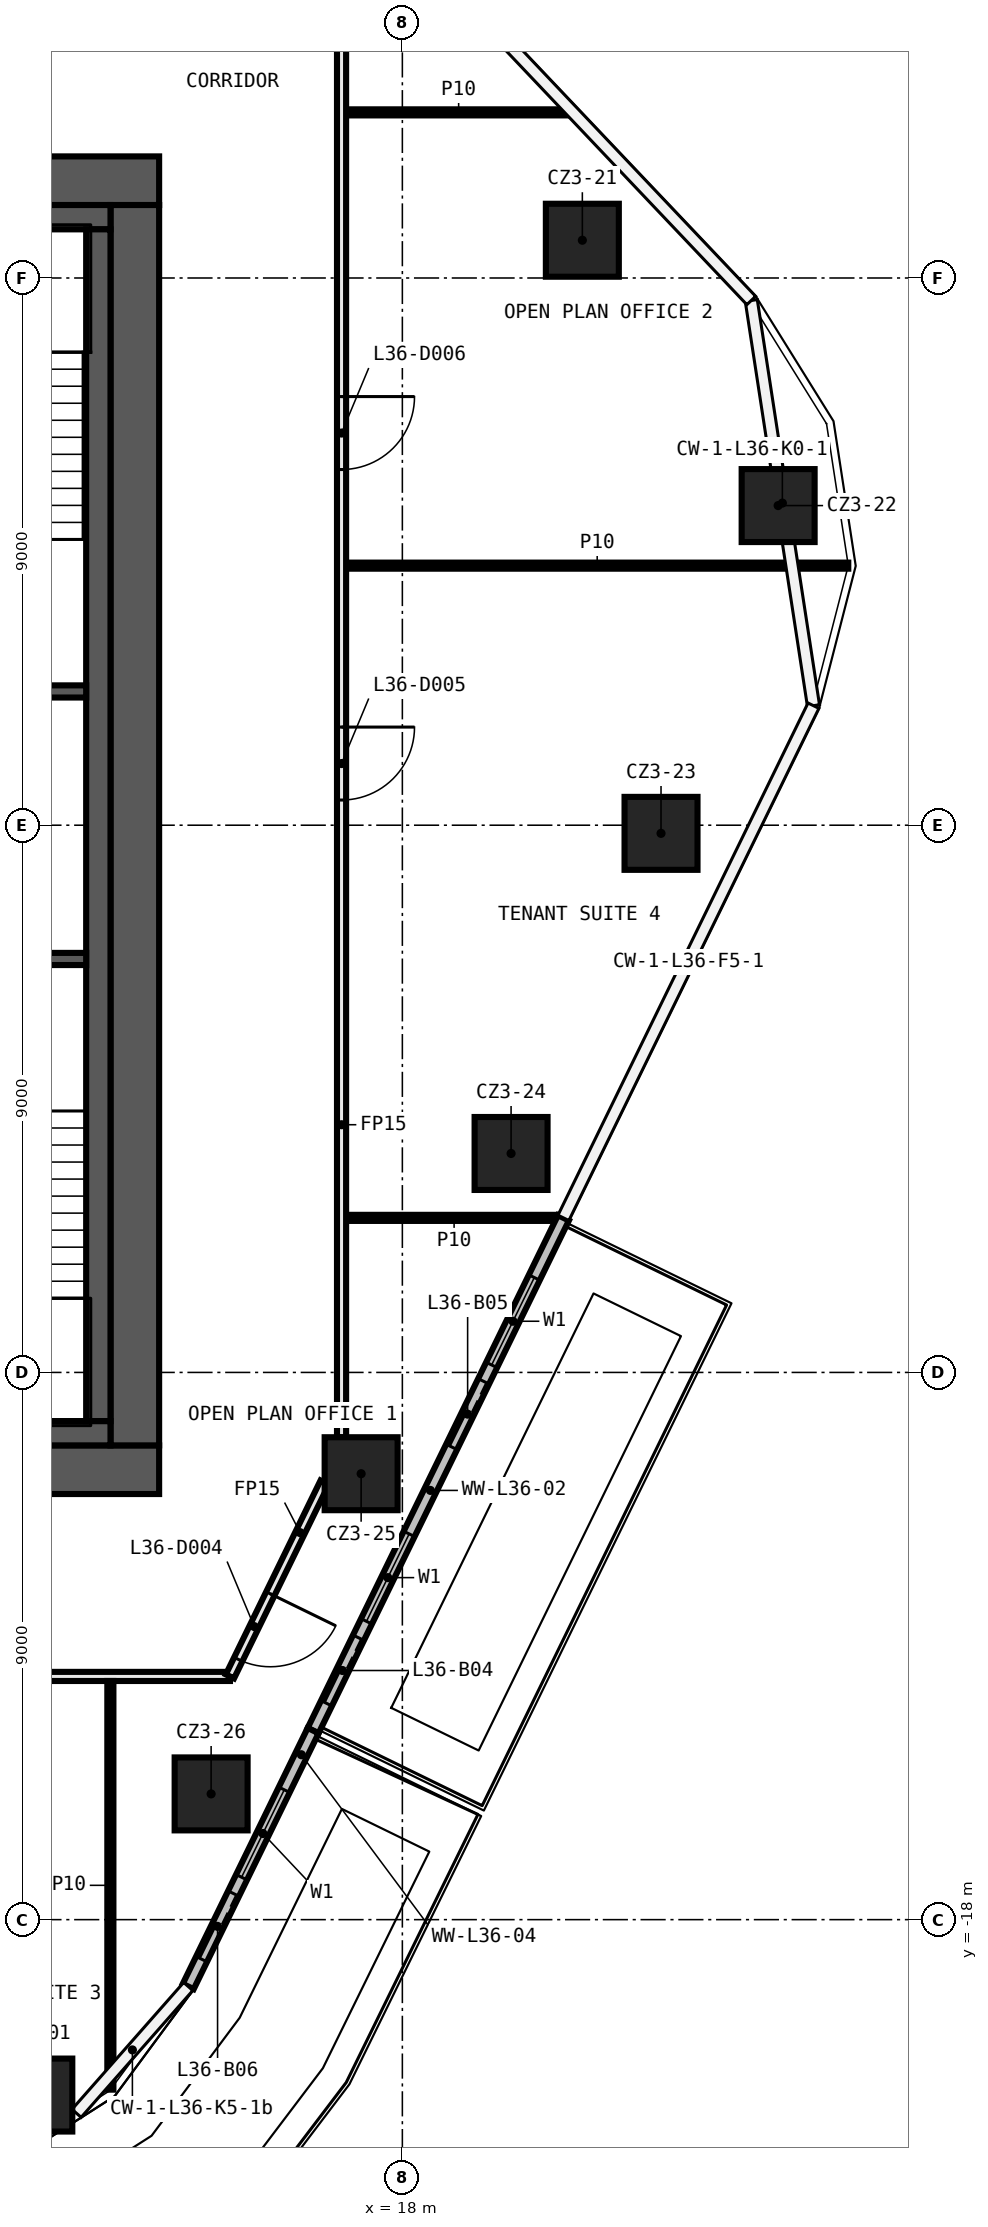
"""IFC4 building model, lengths in metres.
Left out: names, types, materials, properties, quantities, classifications, styles, units other than length and angle.
Written with IfcOpenShell. Run it as: python <this file> out.ifc"""

import sys

from ifc_helpers import new_model, si_unit, direction, frame, frame_2d, origin, origin_2d, place, context, subcontext, project, spatial, rectangle, extrude, element, fill, save


model = new_model("IFC4")
c1 = context("Model", 3, precision=1e-05, world=origin(), true_north=direction((0.0, 1.0)))
c2 = subcontext(c1, "Body", "Model", "MODEL_VIEW")
j1 = project(units=[si_unit("LENGTHUNIT", "METRE"), si_unit("PLANEANGLEUNIT", "RADIAN")], contexts=[c1])
p1 = place(None, origin())
s1 = spatial("IfcSite", under=j1, at=p1, CompositionType="ELEMENT")
p2 = place(p1, origin())
s2 = spatial("IfcBuilding", under=s1, at=p2, CompositionType="ELEMENT")
p3 = place(p2, frame((0.0, 0.0, 167.0)))
s3 = spatial("IfcBuildingStorey", under=s2, at=p3, CompositionType="ELEMENT", Elevation=167.0)
for number, where, z_axis, x_axis in (
    (1, (11.972, -20.885, 0.0), (0.0, 0.0, 1.0), (1.0, 0.0, 0.0)),
    (2, (20.96, 9.621, 0.0), (0.0, 0.0, 1.0), (1.0, 0.0, 0.0)),
    (3, (24.18, 5.257, 0.0), (0.0, 0.0, 1.0), (1.0, 0.0, 0.0)),
    (4, (22.254, -0.134, 0.0), (0.0, 0.0, 1.0), (1.0, 0.0, 0.0)),
    (5, (19.788, -5.399, 0.0), (0.0, 0.0, 1.0), (1.0, 0.0, 0.0)),
    (6, (17.322, -10.666, 0.0), (0.0, 0.0, 1.0), (1.0, 0.0, 0.0)),
    (7, (14.855, -15.932, 0.0), (0.0, 0.0, 1.0), (1.0, 0.0, 0.0)),
):
    element("IfcColumn", number, at=place(p3, frame(where, z_axis=z_axis, x_axis=x_axis)), inside=s3, PredefinedType="COLUMN", context=c2, shape_type="SweptSolid", body=[
        extrude(rectangle(XDim=1.2, YDim=1.2, at=origin_2d()), origin(), (0.0, 0.0, 1.0), 3.82),
    ])
p4 = place(p3, frame((15.165, -14.0, 0.0), z_axis=(0.0, 0.0, 1.0), x_axis=(-1.0, 0.0, 0.0)))
e8 = element("IfcWall", 8, at=p4, inside=s3, PredefinedType="PARTITIONING", context=c2, shape_type="SweptSolid", body=[
    extrude(rectangle(XDim=24.24, YDim=0.15, at=frame_2d((12.12, 0.0))), origin(), (0.0, 0.0, 1.0), 3.82),
])
p5 = place(p4, frame((15.788, 0.0, 0.0)))
e9 = element("IfcOpeningElement", 9, at=p5, cuts=e8, PredefinedType="OPENING", context=c2, shape_type="SweptSolid", body=[
    extrude(rectangle(XDim=1.2, YDim=2.1, at=frame_2d((0.6, 1.05))), frame((0.0, 0.085, 0.0), z_axis=(0.0, -1.0, 0.0), x_axis=(1.0, 0.0, 0.0)), (0.0, 0.0, 1.0), 0.17),
])
p6 = place(p4, frame((7.379, 0.0, 0.0)))
e10 = element("IfcOpeningElement", 10, at=p6, cuts=e8, PredefinedType="OPENING", context=c2, shape_type="SweptSolid", body=[
    extrude(rectangle(XDim=1.2, YDim=2.1, at=frame_2d((0.6, 1.05))), frame((0.0, 0.085, 0.0), z_axis=(0.0, -1.0, 0.0), x_axis=(1.0, 0.0, 0.0)), (0.0, 0.0, 1.0), 0.17),
])
p7 = place(p4, frame((3.323, 0.0, 0.0)))
e11 = element("IfcOpeningElement", 11, at=p7, cuts=e8, PredefinedType="OPENING", context=c2, shape_type="SweptSolid", body=[
    extrude(rectangle(XDim=1.2, YDim=2.1, at=frame_2d((0.6, 1.05))), frame((0.0, 0.085, 0.0), z_axis=(0.0, -1.0, 0.0), x_axis=(1.0, 0.0, 0.0)), (0.0, 0.0, 1.0), 0.17),
])
p8 = place(p3, frame((17.075, -6.458, 0.0), z_axis=(0.0, 0.0, 1.0), x_axis=(1.0, 0.0, 0.0)))
e12 = element("IfcWall", 12, at=p8, inside=s3, PredefinedType="PARTITIONING", context=c2, shape_type="SweptSolid", body=[
    extrude(rectangle(XDim=3.552, YDim=0.1, at=frame_2d((1.776, 0.0))), origin(), (0.0, 0.0, 1.0), 3.82),
])
p9 = place(p3, frame((17.075, 4.269, 0.0), z_axis=(0.0, 0.0, 1.0), x_axis=(1.0, 0.0, 0.0)))
e13 = element("IfcWall", 13, at=p9, inside=s3, PredefinedType="PARTITIONING", context=c2, shape_type="SweptSolid", body=[
    extrude(rectangle(XDim=8.259, YDim=0.1, at=frame_2d((4.129, 0.0))), origin(), (0.0, 0.0, 1.0), 3.82),
])
p10 = place(p3, frame((17.075, 11.724, 0.0), z_axis=(0.0, 0.0, 1.0), x_axis=(1.0, 0.0, 0.0)))
e14 = element("IfcWall", 14, at=p10, inside=s3, PredefinedType="PARTITIONING", context=c2, shape_type="SweptSolid", body=[
    extrude(rectangle(XDim=3.701, YDim=0.1, at=frame_2d((1.851, 0.0))), origin(), (0.0, 0.0, 1.0), 3.82),
])
p11 = place(p3, frame((16.722, -10.809, 0.0), z_axis=(0.0, 0.0, 1.0), x_axis=(-0.438666135365, -0.898650110824, 0.0)))
e15 = element("IfcWall", 15, at=p11, inside=s3, PredefinedType="PARTITIONING", context=c2, shape_type="SweptSolid", body=[
    extrude(rectangle(XDim=3.55, YDim=0.15, at=frame_2d((1.775, 0.0))), origin(), (0.0, 0.0, 1.0), 3.82),
])
p12 = place(p11, frame((2.038, 0.0, 0.0)))
e16 = element("IfcOpeningElement", 16, at=p12, cuts=e15, PredefinedType="OPENING", context=c2, shape_type="SweptSolid", body=[
    extrude(rectangle(XDim=1.2, YDim=2.1, at=frame_2d((0.6, 1.05))), frame((0.0, 0.085, 0.0), z_axis=(0.0, -1.0, 0.0), x_axis=(1.0, 0.0, 0.0)), (0.0, 0.0, 1.0), 0.17),
])
p13 = place(p3, frame((17.0, 13.106, 0.0), z_axis=(0.0, 0.0, 1.0), x_axis=(0.0, -1.0, 0.0)))
e17 = element("IfcWall", 17, at=p13, inside=s3, PredefinedType="PARTITIONING", context=c2, shape_type="SweptSolid", body=[
    extrude(rectangle(XDim=23.172, YDim=0.15, at=frame_2d((11.586, 0.0))), origin(), (0.0, 0.0, 1.0), 3.82),
])
p14 = place(p13, frame((11.492, 0.0, 0.0)))
e18 = element("IfcOpeningElement", 18, at=p14, cuts=e17, PredefinedType="OPENING", context=c2, shape_type="SweptSolid", body=[
    extrude(rectangle(XDim=1.2, YDim=2.1, at=frame_2d((0.6, 1.05))), frame((0.0, 0.085, 0.0), z_axis=(0.0, -1.0, 0.0), x_axis=(1.0, 0.0, 0.0)), (0.0, 0.0, 1.0), 0.17),
])
p15 = place(p13, frame((6.056, 0.0, 0.0)))
e19 = element("IfcOpeningElement", 19, at=p15, cuts=e17, PredefinedType="OPENING", context=c2, shape_type="SweptSolid", body=[
    extrude(rectangle(XDim=1.2, YDim=2.1, at=frame_2d((0.6, 1.05))), frame((0.0, 0.085, 0.0), z_axis=(0.0, -1.0, 0.0), x_axis=(1.0, 0.0, 0.0)), (0.0, 0.0, 1.0), 0.17),
])
p16 = place(p3, frame((13.198, -20.796, 0.0), z_axis=(0.0, 0.0, 1.0), x_axis=(0.0, 1.0, 0.0)))
e20 = element("IfcWall", 20, at=p16, inside=s3, PredefinedType="PARTITIONING", context=c2, shape_type="SweptSolid", body=[
    extrude(rectangle(XDim=6.721, YDim=0.1, at=frame_2d((3.361, 0.0))), origin(), (0.0, 0.0, 1.0), 3.82),
])
p17 = place(p3, frame((16.533, -14.891, 0.0), z_axis=(0.0, 0.0, 1.0), x_axis=(0.438659913387, 0.898653147987, 0.0)))
e21 = element("IfcWall", 21, at=p17, inside=s3, PredefinedType="SOLIDWALL", context=c2, shape_type="SweptSolid", body=[
    extrude(rectangle(XDim=9.384, YDim=0.2, at=frame_2d((4.692, 0.0))), origin(), (0.0, 0.0, 1.0), 3.82),
])
p18 = place(p17, frame((2.0, 0.0, 0.6)))
e22 = element("IfcOpeningElement", 22, at=p18, cuts=e21, PredefinedType="OPENING", context=c2, shape_type="SweptSolid", body=[
    extrude(rectangle(XDim=1.6, YDim=2.4, at=frame_2d((0.8, 1.2))), frame((0.0, 0.11, 0.0), z_axis=(0.0, -1.0, 0.0), x_axis=(1.0, 0.0, 0.0)), (0.0, 0.0, 1.0), 0.22),
])
p19 = place(p17, frame((0.5, 0.0, 0.0)))
e23 = element("IfcOpeningElement", 23, at=p19, cuts=e21, PredefinedType="OPENING", context=c2, shape_type="SweptSolid", body=[
    extrude(rectangle(XDim=1.2, YDim=2.4, at=frame_2d((0.6, 1.2))), frame((0.0, 0.11, 0.0), z_axis=(0.0, -1.0, 0.0), x_axis=(1.0, 0.0, 0.0)), (0.0, 0.0, 1.0), 0.22),
])
p20 = place(p17, frame((6.692, 0.0, 0.6)))
e24 = element("IfcOpeningElement", 24, at=p20, cuts=e21, PredefinedType="OPENING", context=c2, shape_type="SweptSolid", body=[
    extrude(rectangle(XDim=1.6, YDim=2.4, at=frame_2d((0.8, 1.2))), frame((0.0, 0.11, 0.0), z_axis=(0.0, -1.0, 0.0), x_axis=(1.0, 0.0, 0.0)), (0.0, 0.0, 1.0), 0.22),
])
p21 = place(p17, frame((5.192, 0.0, 0.0)))
e25 = element("IfcOpeningElement", 25, at=p21, cuts=e21, PredefinedType="OPENING", context=c2, shape_type="SweptSolid", body=[
    extrude(rectangle(XDim=1.2, YDim=2.4, at=frame_2d((0.6, 1.2))), frame((0.0, 0.11, 0.0), z_axis=(0.0, -1.0, 0.0), x_axis=(1.0, 0.0, 0.0)), (0.0, 0.0, 1.0), 0.22),
])
p22 = place(p3, frame((14.479, -19.099, 0.0), z_axis=(0.0, 0.0, 1.0), x_axis=(0.438663973521, 0.898651166101, 0.0)))
e26 = element("IfcWall", 26, at=p22, inside=s3, PredefinedType="SOLIDWALL", context=c2, shape_type="SweptSolid", body=[
    extrude(rectangle(XDim=4.683, YDim=0.2, at=frame_2d((2.341, 0.0))), origin(), (0.0, 0.0, 1.0), 3.82),
])
p23 = place(p22, frame((2.0, 0.0, 0.6)))
e27 = element("IfcOpeningElement", 27, at=p23, cuts=e26, PredefinedType="OPENING", context=c2, shape_type="SweptSolid", body=[
    extrude(rectangle(XDim=1.6, YDim=2.4, at=frame_2d((0.8, 1.2))), frame((0.0, 0.11, 0.0), z_axis=(0.0, -1.0, 0.0), x_axis=(1.0, 0.0, 0.0)), (0.0, 0.0, 1.0), 0.22),
])
p24 = place(p22, frame((0.5, 0.0, 0.0)))
e28 = element("IfcOpeningElement", 28, at=p24, cuts=e26, PredefinedType="OPENING", context=c2, shape_type="SweptSolid", body=[
    extrude(rectangle(XDim=1.2, YDim=2.4, at=frame_2d((0.6, 1.2))), frame((0.0, 0.11, 0.0), z_axis=(0.0, -1.0, 0.0), x_axis=(1.0, 0.0, 0.0)), (0.0, 0.0, 1.0), 0.22),
])
p25 = place(p3, frame((-14.0, 10.6, 0.0), z_axis=(0.0, 0.0, 1.0), x_axis=(1.0, 0.0, 0.0)))
e29 = element("IfcWall", 29, at=p25, inside=s3, PredefinedType="SHEAR", context=c2, shape_type="SweptSolid", body=[
    extrude(rectangle(XDim=28.0, YDim=0.8, at=frame_2d((14.0, 0.0))), origin(), (0.0, 0.0, 1.0), 3.82),
])
p26 = place(p25, frame((15.9, 0.0, 0.0)))
e30 = element("IfcOpeningElement", 30, at=p26, cuts=e29, PredefinedType="OPENING", context=c2, shape_type="SweptSolid", body=[
    extrude(rectangle(XDim=1.6, YDim=2.1, at=frame_2d((0.8, 1.05))), frame((0.0, 0.41, 0.0), z_axis=(0.0, -1.0, 0.0), x_axis=(1.0, 0.0, 0.0)), (0.0, 0.0, 1.0), 0.82),
])
p27 = place(p3, frame((14.0, -10.6, 0.0), z_axis=(0.0, 0.0, 1.0), x_axis=(-1.0, 0.0, 0.0)))
e31 = element("IfcWall", 31, at=p27, inside=s3, PredefinedType="SHEAR", context=c2, shape_type="SweptSolid", body=[
    extrude(rectangle(XDim=28.0, YDim=0.8, at=frame_2d((14.0, 0.0))), origin(), (0.0, 0.0, 1.0), 3.82),
])
p28 = place(p27, frame((5.1, 0.0, 0.0)))
e32 = element("IfcOpeningElement", 32, at=p28, cuts=e31, PredefinedType="OPENING", context=c2, shape_type="SweptSolid", body=[
    extrude(rectangle(XDim=1.6, YDim=2.1, at=frame_2d((0.8, 1.05))), frame((0.0, 0.41, 0.0), z_axis=(0.0, -1.0, 0.0), x_axis=(1.0, 0.0, 0.0)), (0.0, 0.0, 1.0), 0.82),
])
p29 = place(p3, frame((13.6, 10.2, 0.0), z_axis=(0.0, 0.0, 1.0), x_axis=(0.0, -1.0, 0.0)))
e33 = element("IfcWall", 33, at=p29, inside=s3, PredefinedType="SHEAR", context=c2, shape_type="SweptSolid", body=[
    extrude(rectangle(XDim=20.4, YDim=0.8, at=frame_2d((10.2, 0.0))), origin(), (0.0, 0.0, 1.0), 3.82),
])
p30 = place(p3, frame((3.9, 10.0, 0.0), z_axis=(0.0, 0.0, 1.0), x_axis=(1.0, 0.0, 0.0)))
e34 = element("IfcWall", 34, at=p30, inside=s3, PredefinedType="SHEAR", context=c2, shape_type="SweptSolid", body=[
    extrude(rectangle(XDim=9.3, YDim=0.4, at=frame_2d((4.65, 0.0))), origin(), (0.0, 0.0, 1.0), 3.82),
])
p31 = place(p3, frame((13.2, -10.0, 0.0), z_axis=(0.0, 0.0, 1.0), x_axis=(-1.0, 0.0, 0.0)))
e35 = element("IfcWall", 35, at=p31, inside=s3, PredefinedType="SHEAR", context=c2, shape_type="SweptSolid", body=[
    extrude(rectangle(XDim=3.9, YDim=0.4, at=frame_2d((1.95, 0.0))), origin(), (0.0, 0.0, 1.0), 3.82),
])
p32 = place(p3, frame((13.0, 9.8, 0.0), z_axis=(0.0, 0.0, 1.0), x_axis=(0.0, -1.0, 0.0)))
e36 = element("IfcWall", 36, at=p32, inside=s3, PredefinedType="SHEAR", context=c2, shape_type="SweptSolid", body=[
    extrude(rectangle(XDim=19.6, YDim=0.4, at=frame_2d((9.8, 0.0))), origin(), (0.0, 0.0, 1.0), 3.82),
])
for number, where, z_axis, x_axis in (
    (37, (9.45, 2.2, 0.0), (0.0, 0.0, 1.0), (1.0, 0.0, 0.0)),
    (38, (9.45, -2.2, 0.0), (0.0, 0.0, 1.0), (1.0, 0.0, 0.0)),
):
    element("IfcWall", number, at=place(p3, frame(where, z_axis=z_axis, x_axis=x_axis)), inside=s3, PredefinedType="SHEAR", context=c2, shape_type="SweptSolid", body=[
        extrude(rectangle(XDim=3.35, YDim=0.2, at=frame_2d((1.675, 0.0))), origin(), (0.0, 0.0, 1.0), 3.82),
    ])
p33 = place(p12, origin())
e39 = element("IfcDoor", 39, at=p33, inside=s3, OperationType="SINGLE_SWING_LEFT", PredefinedType="DOOR", context=c2, shape_type="SweptSolid", body=[
    extrude(rectangle(XDim=1.2, YDim=2.1, at=frame_2d((0.6, 1.05))), frame((0.0, 0.025, 0.0), z_axis=(0.0, -1.0, 0.0), x_axis=(1.0, 0.0, 0.0)), (0.0, 0.0, 1.0), 0.05),
])
fill(e16, e39)
p34 = place(p14, origin())
e40 = element("IfcDoor", 40, at=p34, inside=s3, OperationType="SINGLE_SWING_RIGHT", PredefinedType="DOOR", context=c2, shape_type="SweptSolid", body=[
    extrude(rectangle(XDim=1.2, YDim=2.1, at=frame_2d((0.6, 1.05))), frame((0.0, 0.025, 0.0), z_axis=(0.0, -1.0, 0.0), x_axis=(1.0, 0.0, 0.0)), (0.0, 0.0, 1.0), 0.05),
])
fill(e18, e40)
p35 = place(p15, origin())
e41 = element("IfcDoor", 41, at=p35, inside=s3, OperationType="SINGLE_SWING_LEFT", PredefinedType="DOOR", context=c2, shape_type="SweptSolid", body=[
    extrude(rectangle(XDim=1.2, YDim=2.1, at=frame_2d((0.6, 1.05))), frame((0.0, 0.025, 0.0), z_axis=(0.0, -1.0, 0.0), x_axis=(1.0, 0.0, 0.0)), (0.0, 0.0, 1.0), 0.05),
])
fill(e19, e41)
p36 = place(p18, origin())
e42 = element("IfcWindow", 42, at=p36, inside=s3, PartitioningType="SINGLE_PANEL", PredefinedType="WINDOW", context=c2, shape_type="SweptSolid", body=[
    extrude(rectangle(XDim=1.6, YDim=2.4, at=frame_2d((0.8, 1.2))), frame((0.0, 0.03, 0.0), z_axis=(0.0, -1.0, 0.0), x_axis=(1.0, 0.0, 0.0)), (0.0, 0.0, 1.0), 0.06),
])
fill(e22, e42)
p37 = place(p19, origin())
e43 = element("IfcDoor", 43, at=p37, inside=s3, OperationType="SLIDING_TO_LEFT", PredefinedType="DOOR", context=c2, shape_type="SweptSolid", body=[
    extrude(rectangle(XDim=1.2, YDim=2.4, at=frame_2d((0.6, 1.2))), frame((0.0, 0.025, 0.0), z_axis=(0.0, -1.0, 0.0), x_axis=(1.0, 0.0, 0.0)), (0.0, 0.0, 1.0), 0.05),
])
fill(e23, e43)
p38 = place(p20, origin())
e44 = element("IfcWindow", 44, at=p38, inside=s3, PartitioningType="SINGLE_PANEL", PredefinedType="WINDOW", context=c2, shape_type="SweptSolid", body=[
    extrude(rectangle(XDim=1.6, YDim=2.4, at=frame_2d((0.8, 1.2))), frame((0.0, 0.03, 0.0), z_axis=(0.0, -1.0, 0.0), x_axis=(1.0, 0.0, 0.0)), (0.0, 0.0, 1.0), 0.06),
])
fill(e24, e44)
p39 = place(p21, origin())
e45 = element("IfcDoor", 45, at=p39, inside=s3, OperationType="SLIDING_TO_LEFT", PredefinedType="DOOR", context=c2, shape_type="SweptSolid", body=[
    extrude(rectangle(XDim=1.2, YDim=2.4, at=frame_2d((0.6, 1.2))), frame((0.0, 0.025, 0.0), z_axis=(0.0, -1.0, 0.0), x_axis=(1.0, 0.0, 0.0)), (0.0, 0.0, 1.0), 0.05),
])
fill(e25, e45)
p40 = place(p23, origin())
e46 = element("IfcWindow", 46, at=p40, inside=s3, PartitioningType="SINGLE_PANEL", PredefinedType="WINDOW", context=c2, shape_type="SweptSolid", body=[
    extrude(rectangle(XDim=1.6, YDim=2.4, at=frame_2d((0.8, 1.2))), frame((0.0, 0.03, 0.0), z_axis=(0.0, -1.0, 0.0), x_axis=(1.0, 0.0, 0.0)), (0.0, 0.0, 1.0), 0.06),
])
fill(e27, e46)
p41 = place(p24, origin())
e47 = element("IfcDoor", 47, at=p41, inside=s3, OperationType="SLIDING_TO_LEFT", PredefinedType="DOOR", context=c2, shape_type="SweptSolid", body=[
    extrude(rectangle(XDim=1.2, YDim=2.4, at=frame_2d((0.6, 1.2))), frame((0.0, 0.025, 0.0), z_axis=(0.0, -1.0, 0.0), x_axis=(1.0, 0.0, 0.0)), (0.0, 0.0, 1.0), 0.05),
])
fill(e28, e47)
save(model, sys.argv[1])
